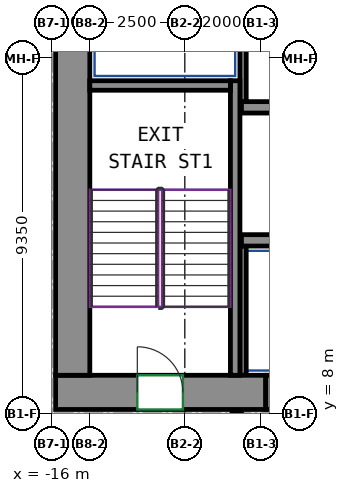
"""IFC4 building model, lengths in metres.
Left out: names, types, materials, properties, quantities, classifications, styles, units other than length and angle.
Written with IfcOpenShell. Run it as: python <this file> out.ifc"""

import sys

from ifc_helpers import new_model, si_unit, direction, frame, frame_2d, origin, place, context, subcontext, project, spatial, rectangle, extrude, source, transform, mapped, element, fill, save


model = new_model("IFC4")
c1 = context("Model", 3, precision=1e-05, world=origin(), true_north=direction((0.0, 1.0)))
c2 = subcontext(c1, "Body", "Model", "MODEL_VIEW")
j1 = project(units=[si_unit("LENGTHUNIT", "METRE"), si_unit("PLANEANGLEUNIT", "RADIAN")], contexts=[c1])
p1 = place(None, origin())
s1 = spatial("IfcSite", under=j1, at=p1, CompositionType="ELEMENT")
p2 = place(p1, origin())
s2 = spatial("IfcBuilding", under=s1, at=p2, CompositionType="ELEMENT")
p3 = place(p2, frame((0.0, 0.0, 116.6)))
s3 = spatial("IfcBuildingStorey", under=s2, at=p3, CompositionType="ELEMENT", Elevation=116.6)
m1 = source(origin(), c2, "Body", "SweptSolid", [
    extrude(rectangle(XDim=5.53, YDim=0.9, at=frame_2d((2.765, 0.0))), origin(), (0.0, 0.0, 1.0), 3.72),
])
p4 = place(p3, frame((-15.9, 8.55, 0.0), z_axis=(0.0, 0.0, 1.0), x_axis=(1.0, 0.0, 0.0)))
e1 = element("IfcWall", 1, at=p4, inside=s3, PredefinedType="SHEAR", context=c2, shape_type="MappedRepresentation", body=[
    mapped(m1, transform((0.0, 0.0, 0.0))),
])
p5 = place(p4, frame((2.15, 0.0, 0.0)))
e2 = element("IfcOpeningElement", 2, at=p5, cuts=e1, PredefinedType="OPENING", context=c2, shape_type="SweptSolid", body=[
    extrude(rectangle(XDim=1.2, YDim=2.1, at=frame_2d((0.6, 1.05))), frame((0.0, 0.46, 0.0), z_axis=(0.0, -1.0, 0.0), x_axis=(1.0, 0.0, 0.0)), (0.0, 0.0, 1.0), 0.92),
])
m2 = source(origin(), c2, "Body", "SweptSolid", [
    extrude(rectangle(XDim=12.0, YDim=0.9, at=frame_2d((6.0, 0.0))), origin(), (0.0, 0.0, 1.0), 3.72),
])
p6 = place(p3, frame((-15.45, 9.0, 0.0), z_axis=(0.0, 0.0, 1.0), x_axis=(0.0, 1.0, 0.0)))
e3 = element("IfcWall", 3, at=p6, inside=s3, PredefinedType="SHEAR", context=c2, shape_type="MappedRepresentation", body=[
    mapped(m2, transform((0.0, 0.0, 0.0))),
])
m3 = source(origin(), c2, "Body", "SweptSolid", [
    extrude(rectangle(XDim=7.75, YDim=0.25, at=frame_2d((3.875, 0.0))), origin(), (0.0, 0.0, 1.0), 3.72),
])
p7 = place(p3, frame((-11.175, 9.0, 0.0), z_axis=(0.0, 0.0, 1.0), x_axis=(0.0, 1.0, 0.0)))
e4 = element("IfcWall", 4, at=p7, inside=s3, PredefinedType="SHEAR", context=c2, shape_type="MappedRepresentation", body=[
    mapped(m3, transform((0.0, 0.0, 0.0))),
])
m4 = source(origin(), c2, "Body", "SweptSolid", [
    extrude(rectangle(XDim=3.7, YDim=0.25, at=frame_2d((1.85, 0.0))), origin(), (0.0, 0.0, 1.0), 3.72),
])
p8 = place(p3, frame((-15.0, 16.625, 0.0), z_axis=(0.0, 0.0, 1.0), x_axis=(1.0, 0.0, 0.0)))
e5 = element("IfcWall", 5, at=p8, inside=s3, PredefinedType="SHEAR", context=c2, shape_type="MappedRepresentation", body=[
    mapped(m4, transform((0.0, 0.0, 0.0))),
])
m5 = source(origin(), c2, "Body", "SweptSolid", [
    extrude(rectangle(XDim=6.0, YDim=0.3, at=frame_2d((3.0, 0.0))), origin(), (0.0, 0.0, 1.0), 3.72),
])
for number, where, z_axis, x_axis in (
    (6, (-11.01, 12.55, 0.0), (0.0, 0.0, 1.0), (1.0, 0.0, 0.0)),
    (7, (-11.01, 16.05, 0.0), (0.0, 0.0, 1.0), (1.0, 0.0, 0.0)),
):
    element("IfcWall", number, at=place(p3, frame(where, z_axis=z_axis, x_axis=x_axis)), inside=s3, PredefinedType="SHEAR", context=c2, shape_type="MappedRepresentation", body=[
        mapped(m5, transform((0.0, 0.0, 0.0))),
    ])
m6 = source(origin(), c2, "Body", "SweptSolid", [
    extrude(rectangle(XDim=4.8, YDim=0.165, at=frame_2d((2.4, 0.0))), origin(), (0.0, 0.0, 1.0), 3.72),
])
p9 = place(p3, frame((-10.968, 16.2, 0.0), z_axis=(0.0, 0.0, 1.0), x_axis=(0.0, 1.0, 0.0)))
e8 = element("IfcWall", 8, at=p9, inside=s3, PredefinedType="PARTITIONING", context=c2, shape_type="MappedRepresentation", body=[
    mapped(m6, transform((0.0, 0.0, 0.0))),
])
m7 = source(origin(), c2, "Body", "SweptSolid", [
    extrude(rectangle(XDim=3.4, YDim=0.165, at=frame_2d((1.7, 0.0))), origin(), (0.0, 0.0, 1.0), 3.72),
])
p10 = place(p3, frame((-10.968, 9.0, 0.0), z_axis=(0.0, 0.0, 1.0), x_axis=(0.0, 1.0, 0.0)))
e9 = element("IfcWall", 9, at=p10, inside=s3, PredefinedType="PARTITIONING", context=c2, shape_type="MappedRepresentation", body=[
    mapped(m7, transform((0.0, 0.0, 0.0))),
])
m8 = source(origin(), c2, "Body", "SweptSolid", [
    extrude(rectangle(XDim=1.4, YDim=0.9, at=frame_2d((0.7, 0.0))), origin(), (0.0, 0.0, 1.0), 2.7),
])
p11 = place(p3, frame((-10.37, 8.55, 0.0), z_axis=(0.0, 0.0, 1.0), x_axis=(1.0, 0.0, 0.0)))
e10 = element("IfcWall", 10, at=p11, inside=s3, PredefinedType="PARTITIONING", context=c2, shape_type="MappedRepresentation", body=[
    mapped(m8, transform((0.0, 0.0, 0.0))),
])
p12 = place(p11, frame((0.25, 0.0, 0.0)))
e11 = element("IfcOpeningElement", 11, at=p12, cuts=e10, PredefinedType="OPENING", context=c2, shape_type="SweptSolid", body=[
    extrude(rectangle(XDim=0.9, YDim=2.1, at=frame_2d((0.45, 1.05))), frame((0.0, 0.46, 0.0), z_axis=(0.0, -1.0, 0.0), x_axis=(1.0, 0.0, 0.0)), (0.0, 0.0, 1.0), 0.92),
])
p13 = place(p5, origin())
e12 = element("IfcDoor", 12, at=p13, inside=s3, OperationType="DOUBLE_DOOR_SINGLE_SWING", PredefinedType="DOOR", context=c2, shape_type="SweptSolid", body=[
    extrude(rectangle(XDim=1.2, YDim=2.1, at=frame_2d((0.6, 1.05))), frame((0.0, 0.355, 0.0), z_axis=(0.0, -1.0, 0.0), x_axis=(1.0, 0.0, 0.0)), (0.0, 0.0, 1.0), 0.05),
])
fill(e2, e12)
save(model, sys.argv[1])
